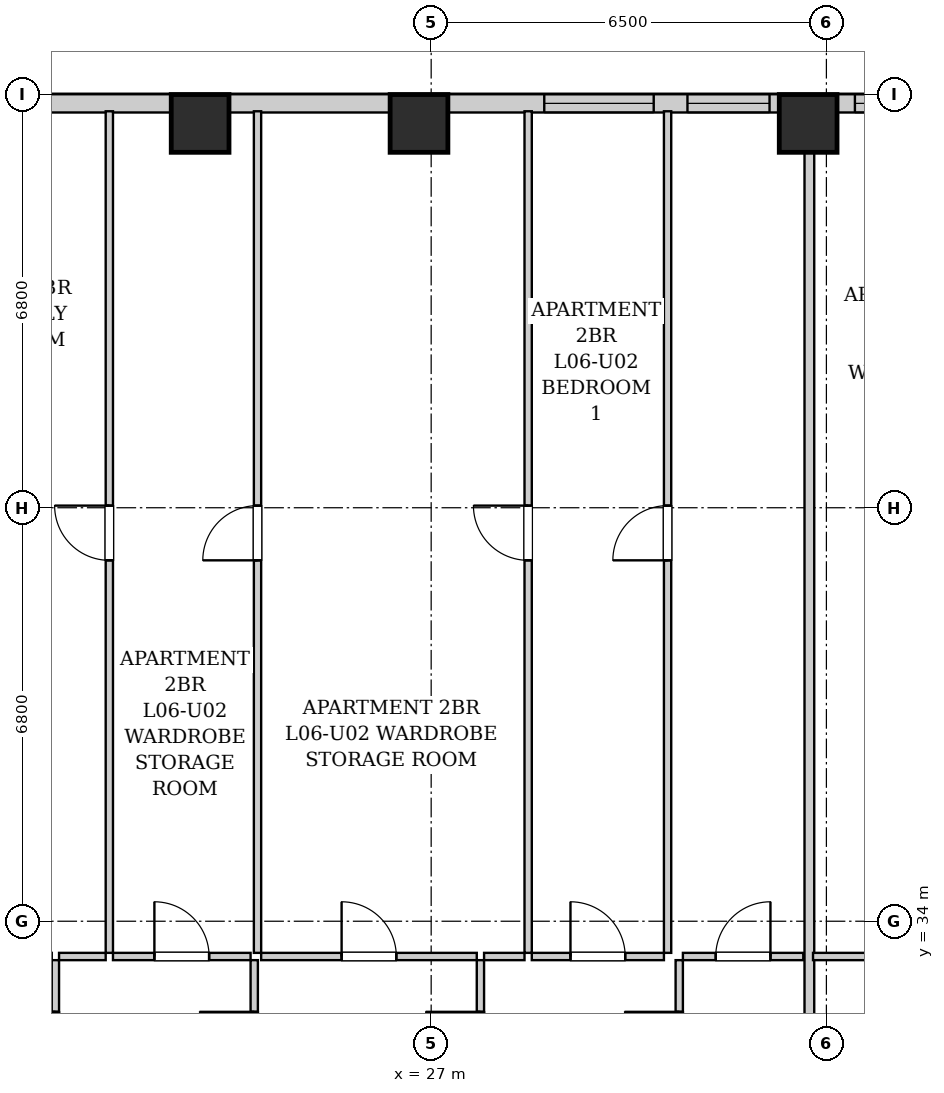
"""IFC4 building model, lengths in metres.
Left out: names, types, materials, properties, quantities, classifications, styles, units other than length and angle.
Written with IfcOpenShell. Run it as: python <this file> out.ifc"""

import sys

from ifc_helpers import new_model, si_unit, direction, frame, frame_2d, origin, origin_2d, place, context, subcontext, project, spatial, rectangle, extrude, element, fill, save


model = new_model("IFC4")
c1 = context("Model", 3, precision=1e-05, world=origin(), true_north=direction((0.0, 1.0)))
c2 = subcontext(c1, "Body", "Model", "MODEL_VIEW")
j1 = project(units=[si_unit("LENGTHUNIT", "METRE"), si_unit("PLANEANGLEUNIT", "RADIAN")], contexts=[c1])
p1 = place(None, origin())
s1 = spatial("IfcSite", under=j1, at=p1, CompositionType="ELEMENT")
p2 = place(p1, origin())
s2 = spatial("IfcBuilding", under=s1, at=p2, CompositionType="ELEMENT")
p3 = place(p2, frame((0.0, 0.0, 29.0)))
s3 = spatial("IfcBuildingStorey", under=s2, at=p3, CompositionType="ELEMENT", Elevation=29.0)
for number, where, z_axis, x_axis in (
    (1, (23.2, 47.12, 0.0), (0.0, 0.0, 1.0), (1.0, 0.0, 0.0)),
    (2, (26.8, 47.12, 0.0), (0.0, 0.0, 1.0), (1.0, 0.0, 0.0)),
    (3, (33.2, 47.12, 0.0), (0.0, 0.0, 1.0), (1.0, 0.0, 0.0)),
):
    element("IfcColumn", number, at=place(p3, frame(where, z_axis=z_axis, x_axis=x_axis)), inside=s3, PredefinedType="COLUMN", context=c2, shape_type="SweptSolid", body=[
        extrude(rectangle(XDim=0.95, YDim=0.95, at=origin_2d()), origin(), (0.0, 0.0, 1.0), 3.2),
    ])
p4 = place(p3, frame((10.0, 47.45, 0.0), z_axis=(0.0, 0.0, 1.0), x_axis=(1.0, 0.0, 0.0)))
e4 = element("IfcWall", 4, at=p4, inside=s3, PredefinedType="SOLIDWALL", context=c2, shape_type="SweptSolid", body=[
    extrude(rectangle(XDim=28.1, YDim=0.3, at=frame_2d((14.05, 0.0))), origin(), (0.0, 0.0, 1.0), 1.975),
])
p5 = place(p4, frame((5.712, 0.0, 0.55)))
e5 = element("IfcOpeningElement", 5, at=p5, cuts=e4, PredefinedType="OPENING", context=c2, shape_type="SweptSolid", body=[
    extrude(rectangle(XDim=1.35, YDim=1.2, at=frame_2d((0.675, 0.6))), frame((0.0, 0.16, 0.0), z_axis=(0.0, -1.0, 0.0), x_axis=(1.0, 0.0, 0.0)), (0.0, 0.0, 1.0), 0.32),
])
p6 = place(p4, frame((8.792, 0.0, 0.55)))
e6 = element("IfcOpeningElement", 6, at=p6, cuts=e4, PredefinedType="OPENING", context=c2, shape_type="SweptSolid", body=[
    extrude(rectangle(XDim=1.8, YDim=1.2, at=frame_2d((0.9, 0.6))), frame((0.0, 0.16, 0.0), z_axis=(0.0, -1.0, 0.0), x_axis=(1.0, 0.0, 0.0)), (0.0, 0.0, 1.0), 0.32),
])
p7 = place(p4, frame((18.86, 0.0, 0.55)))
e7 = element("IfcOpeningElement", 7, at=p7, cuts=e4, PredefinedType="OPENING", context=c2, shape_type="SweptSolid", body=[
    extrude(rectangle(XDim=1.8, YDim=1.2, at=frame_2d((0.9, 0.6))), frame((0.0, 0.16, 0.0), z_axis=(0.0, -1.0, 0.0), x_axis=(1.0, 0.0, 0.0)), (0.0, 0.0, 1.0), 0.32),
])
p8 = place(p4, frame((21.215, 0.0, 0.55)))
e8 = element("IfcOpeningElement", 8, at=p8, cuts=e4, PredefinedType="OPENING", context=c2, shape_type="SweptSolid", body=[
    extrude(rectangle(XDim=1.35, YDim=1.2, at=frame_2d((0.675, 0.6))), frame((0.0, 0.16, 0.0), z_axis=(0.0, -1.0, 0.0), x_axis=(1.0, 0.0, 0.0)), (0.0, 0.0, 1.0), 0.32),
])
p9 = place(p4, frame((23.969, 0.0, 0.55)))
e9 = element("IfcOpeningElement", 9, at=p9, cuts=e4, PredefinedType="OPENING", context=c2, shape_type="SweptSolid", body=[
    extrude(rectangle(XDim=1.8, YDim=1.2, at=frame_2d((0.9, 0.6))), frame((0.0, 0.16, 0.0), z_axis=(0.0, -1.0, 0.0), x_axis=(1.0, 0.0, 0.0)), (0.0, 0.0, 1.0), 0.32),
])
p10 = place(p4, frame((26.698, 0.0, 0.55)))
e10 = element("IfcOpeningElement", 10, at=p10, cuts=e4, PredefinedType="OPENING", context=c2, shape_type="SweptSolid", body=[
    extrude(rectangle(XDim=0.85, YDim=1.2, at=frame_2d((0.425, 0.6))), frame((0.0, 0.16, 0.0), z_axis=(0.0, -1.0, 0.0), x_axis=(1.0, 0.0, 0.0)), (0.0, 0.0, 1.0), 0.32),
])
p11 = place(p3, frame((20.82, 30.76, 0.0), z_axis=(0.0, 0.0, 1.0), x_axis=(0.0, 1.0, 0.0)))
e11 = element("IfcWall", 11, at=p11, inside=s3, PredefinedType="PARTITIONING", context=c2, shape_type="SweptSolid", body=[
    extrude(rectangle(XDim=2.6, YDim=0.12, at=frame_2d((1.3, 0.0))), origin(), (0.0, 0.0, 1.0), 2.94),
])
p12 = place(p11, frame((0.85, 0.0, 0.0)))
e12 = element("IfcOpeningElement", 12, at=p12, cuts=e11, PredefinedType="OPENING", context=c2, shape_type="SweptSolid", body=[
    extrude(rectangle(XDim=0.9, YDim=2.05, at=frame_2d((0.45, 1.025))), frame((0.0, 0.07, 0.0), z_axis=(0.0, -1.0, 0.0), x_axis=(1.0, 0.0, 0.0)), (0.0, 0.0, 1.0), 0.14),
])
p13 = place(p3, frame((24.09, 30.76, 0.0), z_axis=(0.0, 0.0, 1.0), x_axis=(0.0, 1.0, 0.0)))
e13 = element("IfcWall", 13, at=p13, inside=s3, PredefinedType="PARTITIONING", context=c2, shape_type="SweptSolid", body=[
    extrude(rectangle(XDim=2.6, YDim=0.12, at=frame_2d((1.3, 0.0))), origin(), (0.0, 0.0, 1.0), 2.94),
])
p14 = place(p13, frame((0.85, 0.0, 0.0)))
e14 = element("IfcOpeningElement", 14, at=p14, cuts=e13, PredefinedType="OPENING", context=c2, shape_type="SweptSolid", body=[
    extrude(rectangle(XDim=0.9, YDim=2.05, at=frame_2d((0.45, 1.025))), frame((0.0, 0.07, 0.0), z_axis=(0.0, -1.0, 0.0), x_axis=(1.0, 0.0, 0.0)), (0.0, 0.0, 1.0), 0.14),
])
p15 = place(p3, frame((20.88, 33.42, 0.0), z_axis=(0.0, 0.0, 1.0), x_axis=(1.0, 0.0, 0.0)))
e15 = element("IfcWall", 15, at=p15, inside=s3, PredefinedType="PARTITIONING", context=c2, shape_type="SweptSolid", body=[
    extrude(rectangle(XDim=0.767, YDim=0.12, at=frame_2d((0.384, 0.0))), origin(), (0.0, 0.0, 1.0), 2.94),
])
p16 = place(p3, frame((21.767, 33.42, 0.0), z_axis=(0.0, 0.0, 1.0), x_axis=(1.0, 0.0, 0.0)))
e16 = element("IfcWall", 16, at=p16, inside=s3, PredefinedType="PARTITIONING", context=c2, shape_type="SweptSolid", body=[
    extrude(rectangle(XDim=2.263, YDim=0.12, at=frame_2d((1.131, 0.0))), origin(), (0.0, 0.0, 1.0), 2.94),
])
p17 = place(p16, frame((0.681, 0.0, 0.0)))
e17 = element("IfcOpeningElement", 17, at=p17, cuts=e16, PredefinedType="OPENING", context=c2, shape_type="SweptSolid", body=[
    extrude(rectangle(XDim=0.9, YDim=2.05, at=frame_2d((0.45, 1.025))), frame((0.0, 0.07, 0.0), z_axis=(0.0, -1.0, 0.0), x_axis=(1.0, 0.0, 0.0)), (0.0, 0.0, 1.0), 0.14),
])
p18 = place(p3, frame((27.81, 30.76, 0.0), z_axis=(0.0, 0.0, 1.0), x_axis=(0.0, 1.0, 0.0)))
e18 = element("IfcWall", 18, at=p18, inside=s3, PredefinedType="PARTITIONING", context=c2, shape_type="SweptSolid", body=[
    extrude(rectangle(XDim=2.6, YDim=0.12, at=frame_2d((1.3, 0.0))), origin(), (0.0, 0.0, 1.0), 2.94),
])
p19 = place(p18, frame((0.85, 0.0, 0.0)))
e19 = element("IfcOpeningElement", 19, at=p19, cuts=e18, PredefinedType="OPENING", context=c2, shape_type="SweptSolid", body=[
    extrude(rectangle(XDim=0.9, YDim=2.05, at=frame_2d((0.45, 1.025))), frame((0.0, 0.07, 0.0), z_axis=(0.0, -1.0, 0.0), x_axis=(1.0, 0.0, 0.0)), (0.0, 0.0, 1.0), 0.14),
])
p20 = place(p3, frame((24.204, 33.42, 0.0), z_axis=(0.0, 0.0, 1.0), x_axis=(1.0, 0.0, 0.0)))
e20 = element("IfcWall", 20, at=p20, inside=s3, PredefinedType="PARTITIONING", context=c2, shape_type="SweptSolid", body=[
    extrude(rectangle(XDim=3.546, YDim=0.12, at=frame_2d((1.773, 0.0))), origin(), (0.0, 0.0, 1.0), 2.94),
])
p21 = place(p20, frame((1.323, 0.0, 0.0)))
e21 = element("IfcOpeningElement", 21, at=p21, cuts=e20, PredefinedType="OPENING", context=c2, shape_type="SweptSolid", body=[
    extrude(rectangle(XDim=0.9, YDim=2.05, at=frame_2d((0.45, 1.025))), frame((0.0, 0.07, 0.0), z_axis=(0.0, -1.0, 0.0), x_axis=(1.0, 0.0, 0.0)), (0.0, 0.0, 1.0), 0.14),
])
p22 = place(p3, frame((31.08, 30.76, 0.0), z_axis=(0.0, 0.0, 1.0), x_axis=(0.0, 1.0, 0.0)))
e22 = element("IfcWall", 22, at=p22, inside=s3, PredefinedType="PARTITIONING", context=c2, shape_type="SweptSolid", body=[
    extrude(rectangle(XDim=2.6, YDim=0.12, at=frame_2d((1.3, 0.0))), origin(), (0.0, 0.0, 1.0), 2.94),
])
p23 = place(p22, frame((0.85, 0.0, 0.0)))
e23 = element("IfcOpeningElement", 23, at=p23, cuts=e22, PredefinedType="OPENING", context=c2, shape_type="SweptSolid", body=[
    extrude(rectangle(XDim=0.9, YDim=2.05, at=frame_2d((0.45, 1.025))), frame((0.0, 0.07, 0.0), z_axis=(0.0, -1.0, 0.0), x_axis=(1.0, 0.0, 0.0)), (0.0, 0.0, 1.0), 0.14),
])
p24 = place(p3, frame((27.87, 33.42, 0.0), z_axis=(0.0, 0.0, 1.0), x_axis=(1.0, 0.0, 0.0)))
e24 = element("IfcWall", 24, at=p24, inside=s3, PredefinedType="PARTITIONING", context=c2, shape_type="SweptSolid", body=[
    extrude(rectangle(XDim=0.665, YDim=0.12, at=frame_2d((0.333, 0.0))), origin(), (0.0, 0.0, 1.0), 2.94),
])
p25 = place(p3, frame((28.655, 33.42, 0.0), z_axis=(0.0, 0.0, 1.0), x_axis=(1.0, 0.0, 0.0)))
e25 = element("IfcWall", 25, at=p25, inside=s3, PredefinedType="PARTITIONING", context=c2, shape_type="SweptSolid", body=[
    extrude(rectangle(XDim=2.173, YDim=0.12, at=frame_2d((1.086, 0.0))), origin(), (0.0, 0.0, 1.0), 2.94),
])
p26 = place(p25, frame((0.636, 0.0, 0.0)))
e26 = element("IfcOpeningElement", 26, at=p26, cuts=e25, PredefinedType="OPENING", context=c2, shape_type="SweptSolid", body=[
    extrude(rectangle(XDim=0.9, YDim=2.05, at=frame_2d((0.45, 1.025))), frame((0.0, 0.07, 0.0), z_axis=(0.0, -1.0, 0.0), x_axis=(1.0, 0.0, 0.0)), (0.0, 0.0, 1.0), 0.14),
])
p27 = place(p3, frame((31.14, 33.42, 0.0), z_axis=(0.0, 0.0, 1.0), x_axis=(1.0, 0.0, 0.0)))
e27 = element("IfcWall", 27, at=p27, inside=s3, PredefinedType="PARTITIONING", context=c2, shape_type="SweptSolid", body=[
    extrude(rectangle(XDim=1.98, YDim=0.12, at=frame_2d((0.99, 0.0))), origin(), (0.0, 0.0, 1.0), 2.94),
])
p28 = place(p27, frame((0.54, 0.0, 0.0)))
e28 = element("IfcOpeningElement", 28, at=p28, cuts=e27, PredefinedType="OPENING", context=c2, shape_type="SweptSolid", body=[
    extrude(rectangle(XDim=0.9, YDim=2.05, at=frame_2d((0.45, 1.025))), frame((0.0, 0.07, 0.0), z_axis=(0.0, -1.0, 0.0), x_axis=(1.0, 0.0, 0.0)), (0.0, 0.0, 1.0), 0.14),
])
p29 = place(p3, frame((21.707, 33.48, 0.0), z_axis=(0.0, 0.0, 1.0), x_axis=(0.0, 1.0, 0.0)))
e29 = element("IfcWall", 29, at=p29, inside=s3, PredefinedType="PARTITIONING", context=c2, shape_type="SweptSolid", body=[
    extrude(rectangle(XDim=13.84, YDim=0.12, at=frame_2d((6.92, 0.0))), origin(), (0.0, 0.0, 1.0), 2.94),
])
p30 = place(p29, frame((6.455, 0.0, 0.0)))
e30 = element("IfcOpeningElement", 30, at=p30, cuts=e29, PredefinedType="OPENING", context=c2, shape_type="SweptSolid", body=[
    extrude(rectangle(XDim=0.9, YDim=2.05, at=frame_2d((0.45, 1.025))), frame((0.0, 0.07, 0.0), z_axis=(0.0, -1.0, 0.0), x_axis=(1.0, 0.0, 0.0)), (0.0, 0.0, 1.0), 0.14),
])
p31 = place(p3, frame((24.144, 33.48, 0.0), z_axis=(0.0, 0.0, 1.0), x_axis=(0.0, 1.0, 0.0)))
e31 = element("IfcWall", 31, at=p31, inside=s3, PredefinedType="PARTITIONING", context=c2, shape_type="SweptSolid", body=[
    extrude(rectangle(XDim=13.84, YDim=0.12, at=frame_2d((6.92, 0.0))), origin(), (0.0, 0.0, 1.0), 2.94),
])
p32 = place(p31, frame((6.455, 0.0, 0.0)))
e32 = element("IfcOpeningElement", 32, at=p32, cuts=e31, PredefinedType="OPENING", context=c2, shape_type="SweptSolid", body=[
    extrude(rectangle(XDim=0.9, YDim=2.05, at=frame_2d((0.45, 1.025))), frame((0.0, 0.07, 0.0), z_axis=(0.0, -1.0, 0.0), x_axis=(1.0, 0.0, 0.0)), (0.0, 0.0, 1.0), 0.14),
])
p33 = place(p3, frame((28.595, 33.48, 0.0), z_axis=(0.0, 0.0, 1.0), x_axis=(0.0, 1.0, 0.0)))
e33 = element("IfcWall", 33, at=p33, inside=s3, PredefinedType="PARTITIONING", context=c2, shape_type="SweptSolid", body=[
    extrude(rectangle(XDim=13.84, YDim=0.12, at=frame_2d((6.92, 0.0))), origin(), (0.0, 0.0, 1.0), 2.94),
])
p34 = place(p33, frame((6.455, 0.0, 0.0)))
e34 = element("IfcOpeningElement", 34, at=p34, cuts=e33, PredefinedType="OPENING", context=c2, shape_type="SweptSolid", body=[
    extrude(rectangle(XDim=0.9, YDim=2.05, at=frame_2d((0.45, 1.025))), frame((0.0, 0.07, 0.0), z_axis=(0.0, -1.0, 0.0), x_axis=(1.0, 0.0, 0.0)), (0.0, 0.0, 1.0), 0.14),
])
p35 = place(p3, frame((30.888, 33.48, 0.0), z_axis=(0.0, 0.0, 1.0), x_axis=(0.0, 1.0, 0.0)))
e35 = element("IfcWall", 35, at=p35, inside=s3, PredefinedType="PARTITIONING", context=c2, shape_type="SweptSolid", body=[
    extrude(rectangle(XDim=13.84, YDim=0.12, at=frame_2d((6.92, 0.0))), origin(), (0.0, 0.0, 1.0), 2.94),
])
p36 = place(p35, frame((6.455, 0.0, 0.0)))
e36 = element("IfcOpeningElement", 36, at=p36, cuts=e35, PredefinedType="OPENING", context=c2, shape_type="SweptSolid", body=[
    extrude(rectangle(XDim=0.9, YDim=2.05, at=frame_2d((0.45, 1.025))), frame((0.0, 0.07, 0.0), z_axis=(0.0, -1.0, 0.0), x_axis=(1.0, 0.0, 0.0)), (0.0, 0.0, 1.0), 0.14),
])
p37 = place(p3, frame((33.22, 30.76, 0.0), z_axis=(0.0, 0.0, 1.0), x_axis=(0.0, 1.0, 0.0)))
e37 = element("IfcWall", 37, at=p37, inside=s3, PredefinedType="PARTITIONING", context=c2, shape_type="SweptSolid", body=[
    extrude(rectangle(XDim=16.56, YDim=0.16, at=frame_2d((8.28, 0.0))), origin(), (0.0, 0.0, 1.0), 2.155),
])
p38 = place(p3, frame((33.28, 33.42, 0.0), z_axis=(0.0, 0.0, 1.0), x_axis=(1.0, 0.0, 0.0)))
e38 = element("IfcWall", 38, at=p38, inside=s3, PredefinedType="PARTITIONING", context=c2, shape_type="SweptSolid", body=[
    extrude(rectangle(XDim=2.4, YDim=0.12, at=frame_2d((1.2, 0.0))), origin(), (0.0, 0.0, 1.0), 2.94),
])
p39 = place(p12, origin())
e39 = element("IfcDoor", 39, at=p39, inside=s3, OperationType="SINGLE_SWING_RIGHT", PredefinedType="DOOR", context=c2, shape_type="SweptSolid", body=[
    extrude(rectangle(XDim=0.9, YDim=2.05, at=frame_2d((0.45, 1.025))), frame((0.0, 0.025, 0.0), z_axis=(0.0, -1.0, 0.0), x_axis=(1.0, 0.0, 0.0)), (0.0, 0.0, 1.0), 0.05),
])
fill(e12, e39)
p40 = place(p14, origin())
e40 = element("IfcDoor", 40, at=p40, inside=s3, OperationType="SINGLE_SWING_RIGHT", PredefinedType="DOOR", context=c2, shape_type="SweptSolid", body=[
    extrude(rectangle(XDim=0.9, YDim=2.05, at=frame_2d((0.45, 1.025))), frame((0.0, 0.025, 0.0), z_axis=(0.0, -1.0, 0.0), x_axis=(1.0, 0.0, 0.0)), (0.0, 0.0, 1.0), 0.05),
])
fill(e14, e40)
p41 = place(p17, origin())
e41 = element("IfcDoor", 41, at=p41, inside=s3, OperationType="SINGLE_SWING_LEFT", PredefinedType="DOOR", context=c2, shape_type="SweptSolid", body=[
    extrude(rectangle(XDim=0.9, YDim=2.05, at=frame_2d((0.45, 1.025))), frame((0.0, 0.025, 0.0), z_axis=(0.0, -1.0, 0.0), x_axis=(1.0, 0.0, 0.0)), (0.0, 0.0, 1.0), 0.05),
])
fill(e17, e41)
p42 = place(p19, origin())
e42 = element("IfcDoor", 42, at=p42, inside=s3, OperationType="SINGLE_SWING_RIGHT", PredefinedType="DOOR", context=c2, shape_type="SweptSolid", body=[
    extrude(rectangle(XDim=0.9, YDim=2.05, at=frame_2d((0.45, 1.025))), frame((0.0, 0.025, 0.0), z_axis=(0.0, -1.0, 0.0), x_axis=(1.0, 0.0, 0.0)), (0.0, 0.0, 1.0), 0.05),
])
fill(e19, e42)
p43 = place(p21, origin())
e43 = element("IfcDoor", 43, at=p43, inside=s3, OperationType="SINGLE_SWING_LEFT", PredefinedType="DOOR", context=c2, shape_type="SweptSolid", body=[
    extrude(rectangle(XDim=0.9, YDim=2.05, at=frame_2d((0.45, 1.025))), frame((0.0, 0.025, 0.0), z_axis=(0.0, -1.0, 0.0), x_axis=(1.0, 0.0, 0.0)), (0.0, 0.0, 1.0), 0.05),
])
fill(e21, e43)
p44 = place(p23, origin())
e44 = element("IfcDoor", 44, at=p44, inside=s3, OperationType="SINGLE_SWING_RIGHT", PredefinedType="DOOR", context=c2, shape_type="SweptSolid", body=[
    extrude(rectangle(XDim=0.9, YDim=2.05, at=frame_2d((0.45, 1.025))), frame((0.0, 0.025, 0.0), z_axis=(0.0, -1.0, 0.0), x_axis=(1.0, 0.0, 0.0)), (0.0, 0.0, 1.0), 0.05),
])
fill(e23, e44)
p45 = place(p26, origin())
e45 = element("IfcDoor", 45, at=p45, inside=s3, OperationType="SINGLE_SWING_LEFT", PredefinedType="DOOR", context=c2, shape_type="SweptSolid", body=[
    extrude(rectangle(XDim=0.9, YDim=2.05, at=frame_2d((0.45, 1.025))), frame((0.0, 0.025, 0.0), z_axis=(0.0, -1.0, 0.0), x_axis=(1.0, 0.0, 0.0)), (0.0, 0.0, 1.0), 0.05),
])
fill(e26, e45)
p46 = place(p28, origin())
e46 = element("IfcDoor", 46, at=p46, inside=s3, OperationType="SINGLE_SWING_RIGHT", PredefinedType="DOOR", context=c2, shape_type="SweptSolid", body=[
    extrude(rectangle(XDim=0.9, YDim=2.05, at=frame_2d((0.45, 1.025))), frame((0.0, 0.025, 0.0), z_axis=(0.0, -1.0, 0.0), x_axis=(1.0, 0.0, 0.0)), (0.0, 0.0, 1.0), 0.05),
])
fill(e28, e46)
p47 = place(p30, origin())
e47 = element("IfcDoor", 47, at=p47, inside=s3, OperationType="SINGLE_SWING_RIGHT", PredefinedType="DOOR", context=c2, shape_type="SweptSolid", body=[
    extrude(rectangle(XDim=0.9, YDim=2.05, at=frame_2d((0.45, 1.025))), frame((0.0, 0.025, 0.0), z_axis=(0.0, -1.0, 0.0), x_axis=(1.0, 0.0, 0.0)), (0.0, 0.0, 1.0), 0.05),
])
fill(e30, e47)
p48 = place(p32, origin())
e48 = element("IfcDoor", 48, at=p48, inside=s3, OperationType="SINGLE_SWING_LEFT", PredefinedType="DOOR", context=c2, shape_type="SweptSolid", body=[
    extrude(rectangle(XDim=0.9, YDim=2.05, at=frame_2d((0.45, 1.025))), frame((0.0, 0.025, 0.0), z_axis=(0.0, -1.0, 0.0), x_axis=(1.0, 0.0, 0.0)), (0.0, 0.0, 1.0), 0.05),
])
fill(e32, e48)
p49 = place(p34, origin())
e49 = element("IfcDoor", 49, at=p49, inside=s3, OperationType="SINGLE_SWING_RIGHT", PredefinedType="DOOR", context=c2, shape_type="SweptSolid", body=[
    extrude(rectangle(XDim=0.9, YDim=2.05, at=frame_2d((0.45, 1.025))), frame((0.0, 0.025, 0.0), z_axis=(0.0, -1.0, 0.0), x_axis=(1.0, 0.0, 0.0)), (0.0, 0.0, 1.0), 0.05),
])
fill(e34, e49)
p50 = place(p36, origin())
e50 = element("IfcDoor", 50, at=p50, inside=s3, OperationType="SINGLE_SWING_LEFT", PredefinedType="DOOR", context=c2, shape_type="SweptSolid", body=[
    extrude(rectangle(XDim=0.9, YDim=2.05, at=frame_2d((0.45, 1.025))), frame((0.0, 0.025, 0.0), z_axis=(0.0, -1.0, 0.0), x_axis=(1.0, 0.0, 0.0)), (0.0, 0.0, 1.0), 0.05),
])
fill(e36, e50)
p51 = place(p7, origin())
e51 = element("IfcWindow", 51, at=p51, inside=s3, PartitioningType="DOUBLE_PANEL_VERTICAL", PredefinedType="WINDOW", context=c2, shape_type="SweptSolid", body=[
    extrude(rectangle(XDim=1.8, YDim=1.2, at=frame_2d((0.9, 0.6))), frame((0.0, 0.03, 0.0), z_axis=(0.0, -1.0, 0.0), x_axis=(1.0, 0.0, 0.0)), (0.0, 0.0, 1.0), 0.06),
])
fill(e7, e51)
p52 = place(p8, origin())
e52 = element("IfcWindow", 52, at=p52, inside=s3, PartitioningType="SINGLE_PANEL", PredefinedType="WINDOW", context=c2, shape_type="SweptSolid", body=[
    extrude(rectangle(XDim=1.35, YDim=1.2, at=frame_2d((0.675, 0.6))), frame((0.0, 0.03, 0.0), z_axis=(0.0, -1.0, 0.0), x_axis=(1.0, 0.0, 0.0)), (0.0, 0.0, 1.0), 0.06),
])
fill(e8, e52)
p53 = place(p9, origin())
e53 = element("IfcWindow", 53, at=p53, inside=s3, PartitioningType="DOUBLE_PANEL_VERTICAL", PredefinedType="WINDOW", context=c2, shape_type="SweptSolid", body=[
    extrude(rectangle(XDim=1.8, YDim=1.2, at=frame_2d((0.9, 0.6))), frame((0.0, 0.03, 0.0), z_axis=(0.0, -1.0, 0.0), x_axis=(1.0, 0.0, 0.0)), (0.0, 0.0, 1.0), 0.06),
])
fill(e9, e53)
save(model, sys.argv[1])
